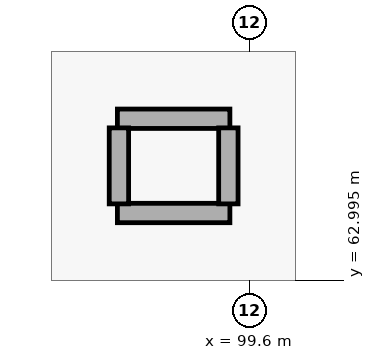
"""IFC4 building model, lengths in metres.
Left out: names, types, materials, properties, quantities, classifications, styles, units other than length and angle.
Written with IfcOpenShell. Run it as: python <this file> out.ifc"""

import sys

from ifc_helpers import new_model, si_unit, direction, frame, frame_2d, origin, place, context, subcontext, project, spatial, rectangle, extrude, element, save


model = new_model("IFC4")
c1 = context("Model", 3, precision=1e-05, world=origin(), true_north=direction((0.0, 1.0)))
c2 = subcontext(c1, "Body", "Model", "MODEL_VIEW")
j1 = project(units=[si_unit("LENGTHUNIT", "METRE"), si_unit("PLANEANGLEUNIT", "RADIAN")], contexts=[c1])
p1 = place(None, origin())
s1 = spatial("IfcSite", under=j1, at=p1, CompositionType="ELEMENT")
p2 = place(p1, origin())
s2 = spatial("IfcBuilding", under=s1, at=p2, CompositionType="ELEMENT")
p3 = place(p2, frame((0.0, 0.0, 15.6)))
s3 = spatial("IfcBuildingStorey", under=s2, at=p3, CompositionType="ELEMENT", Elevation=15.6)
for number, where, z_axis, x_axis in (
    (1, (97.86, 65.12, 0.0), (0.0, 0.0, 1.0), (1.0, 0.0, 0.0)),
    (2, (97.86, 63.88, 0.0), (0.0, 0.0, 1.0), (1.0, 0.0, 0.0)),
):
    element("IfcWall", number, at=place(p3, frame(where, z_axis=z_axis, x_axis=x_axis)), inside=s3, PredefinedType="PARTITIONING", context=c2, shape_type="SweptSolid", body=[
        extrude(rectangle(XDim=1.48, YDim=0.255, at=frame_2d((0.74, 0.0))), origin(), (0.0, 0.0, 1.0), 4.72),
    ])
for number, where, z_axis, x_axis in (
    (3, (97.88, 64.0, 0.0), (0.0, 0.0, 1.0), (0.0, 1.0, 0.0)),
    (4, (99.32, 64.0, 0.0), (0.0, 0.0, 1.0), (0.0, 1.0, 0.0)),
):
    element("IfcWall", number, at=place(p3, frame(where, z_axis=z_axis, x_axis=x_axis)), inside=s3, PredefinedType="PARTITIONING", context=c2, shape_type="SweptSolid", body=[
        extrude(rectangle(XDim=1.0, YDim=0.255, at=frame_2d((0.5, 0.0))), origin(), (0.0, 0.0, 1.0), 4.72),
    ])
save(model, sys.argv[1])
